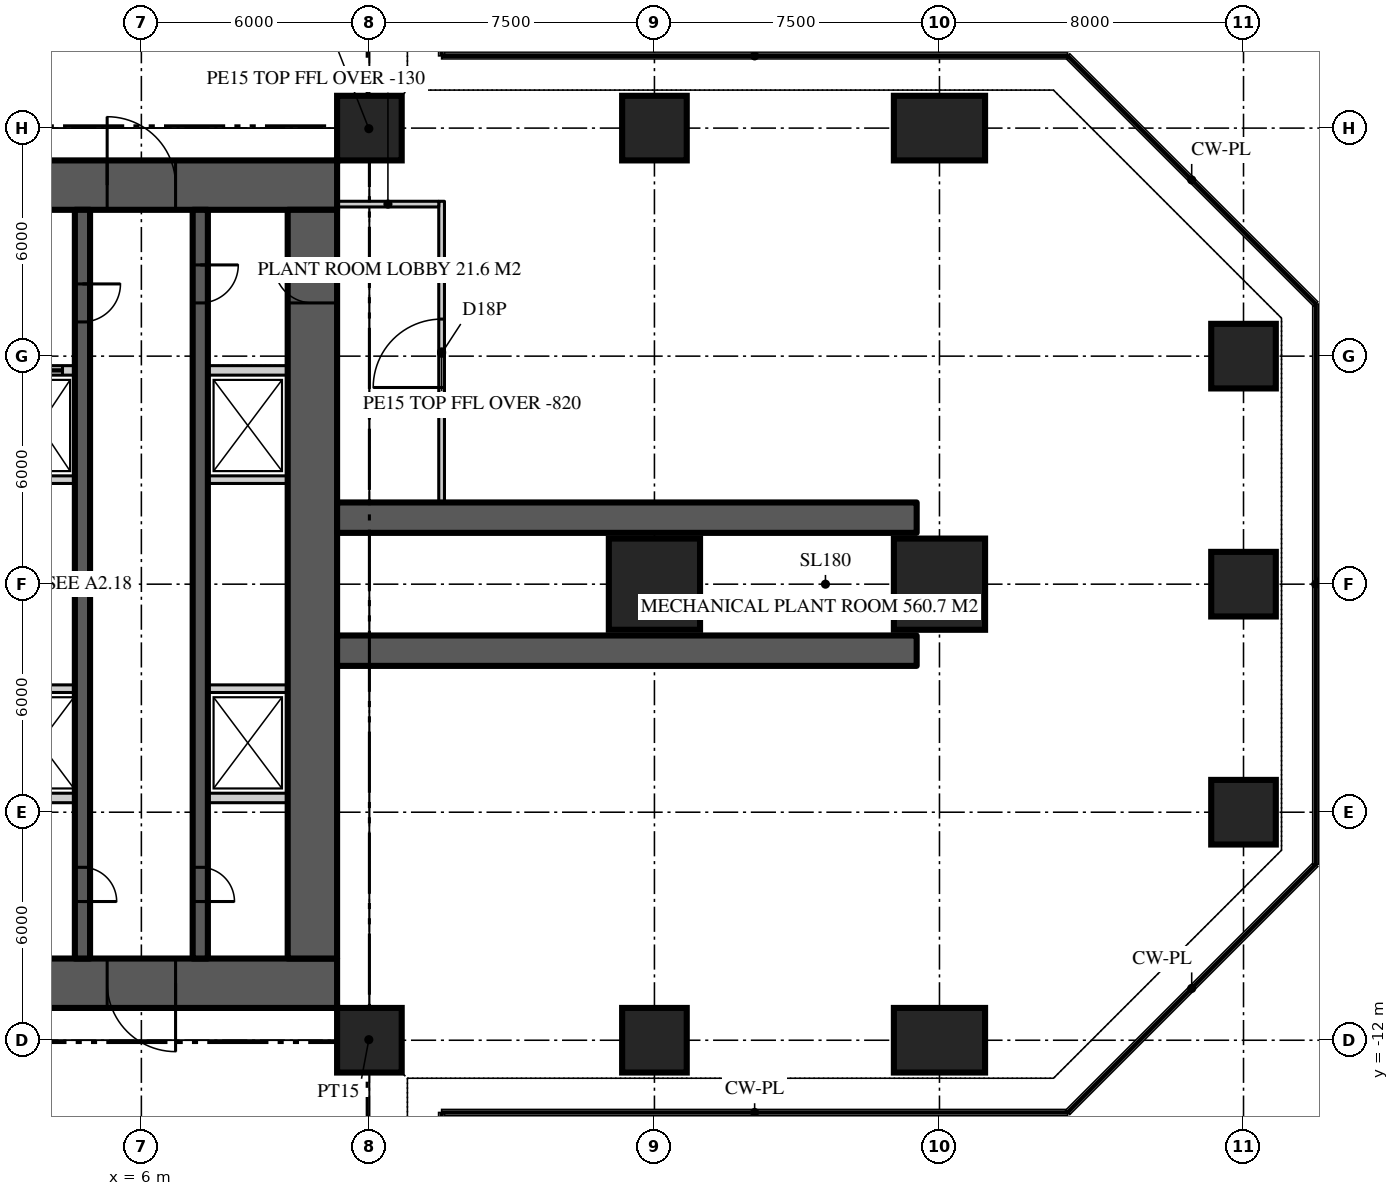
"""IFC4 building model, lengths in metres.
Left out: names, types, materials, properties, quantities, classifications, styles, units other than length and angle.
Written with IfcOpenShell. Run it as: python <this file> out.ifc"""

import sys

from ifc_helpers import new_model, si_unit, direction, frame, frame_2d, origin, origin_2d, place, context, subcontext, project, spatial, rectangle, extrude, element, fill, save


model = new_model("IFC4")
c1 = context("Model", 3, precision=1e-05, world=origin(), true_north=direction((0.0, 1.0)))
c2 = subcontext(c1, "Body", "Model", "MODEL_VIEW")
j1 = project(units=[si_unit("LENGTHUNIT", "METRE"), si_unit("PLANEANGLEUNIT", "RADIAN")], contexts=[c1])
p1 = place(None, origin())
s1 = spatial("IfcSite", under=j1, at=p1, CompositionType="ELEMENT")
p2 = place(p1, origin())
s2 = spatial("IfcBuilding", under=s1, at=p2, CompositionType="ELEMENT")
p3 = place(p2, frame((0.0, 0.0, 118.2)))
s3 = spatial("IfcBuildingStorey", under=s2, at=p3, CompositionType="ELEMENT", Elevation=118.2)
p4 = place(p3, frame((-11.15, 10.5, 0.0), z_axis=(0.0, 0.0, 1.0), x_axis=(1.0, 0.0, 0.0)))
e1 = element("IfcWall", 1, at=p4, inside=s3, PredefinedType="SHEAR", context=c2, shape_type="SweptSolid", body=[
    extrude(rectangle(XDim=22.3, YDim=1.3, at=frame_2d((11.15, 0.0))), origin(), (0.0, 0.0, 1.0), 6.0),
])
p5 = place(p4, frame((4.25, 0.0, 0.0)))
e2 = element("IfcOpeningElement", 2, at=p5, cuts=e1, PredefinedType="OPENING", context=c2, shape_type="SweptSolid", body=[
    extrude(rectangle(XDim=1.8, YDim=2.2, at=frame_2d((0.9, 1.1))), frame((0.0, 0.66, 0.0), z_axis=(0.0, -1.0, 0.0), x_axis=(1.0, 0.0, 0.0)), (0.0, 0.0, 1.0), 1.32),
])
p6 = place(p4, frame((16.25, 0.0, 0.0)))
e3 = element("IfcOpeningElement", 3, at=p6, cuts=e1, PredefinedType="OPENING", context=c2, shape_type="SweptSolid", body=[
    extrude(rectangle(XDim=1.8, YDim=2.2, at=frame_2d((0.9, 1.1))), frame((0.0, 0.66, 0.0), z_axis=(0.0, -1.0, 0.0), x_axis=(1.0, 0.0, 0.0)), (0.0, 0.0, 1.0), 1.32),
])
p7 = place(p3, frame((11.15, -10.5, 0.0), z_axis=(0.0, 0.0, 1.0), x_axis=(-1.0, 0.0, 0.0)))
e4 = element("IfcWall", 4, at=p7, inside=s3, PredefinedType="SHEAR", context=c2, shape_type="SweptSolid", body=[
    extrude(rectangle(XDim=22.3, YDim=1.3, at=frame_2d((11.15, 0.0))), origin(), (0.0, 0.0, 1.0), 6.0),
])
p8 = place(p7, frame((16.25, 0.0, 0.0)))
e5 = element("IfcOpeningElement", 5, at=p8, cuts=e4, PredefinedType="OPENING", context=c2, shape_type="SweptSolid", body=[
    extrude(rectangle(XDim=1.8, YDim=2.2, at=frame_2d((0.9, 1.1))), frame((0.0, 0.66, 0.0), z_axis=(0.0, -1.0, 0.0), x_axis=(1.0, 0.0, 0.0)), (0.0, 0.0, 1.0), 1.32),
])
p9 = place(p7, frame((4.25, 0.0, 0.0)))
e6 = element("IfcOpeningElement", 6, at=p9, cuts=e4, PredefinedType="OPENING", context=c2, shape_type="SweptSolid", body=[
    extrude(rectangle(XDim=1.8, YDim=2.2, at=frame_2d((0.9, 1.1))), frame((0.0, 0.66, 0.0), z_axis=(0.0, -1.0, 0.0), x_axis=(1.0, 0.0, 0.0)), (0.0, 0.0, 1.0), 1.32),
])
p10 = place(p3, frame((10.5, -9.85, 0.0), z_axis=(0.0, 0.0, 1.0), x_axis=(0.0, 1.0, 0.0)))
e7 = element("IfcWall", 7, at=p10, inside=s3, PredefinedType="SHEAR", context=c2, shape_type="SweptSolid", body=[
    extrude(rectangle(XDim=19.7, YDim=1.3, at=frame_2d((9.85, 0.0))), origin(), (0.0, 0.0, 1.0), 6.0),
])
p11 = place(p10, frame((17.25, 0.0, 0.0)))
e8 = element("IfcOpeningElement", 8, at=p11, cuts=e7, PredefinedType="OPENING", context=c2, shape_type="SweptSolid", body=[
    extrude(rectangle(XDim=1.0, YDim=2.2, at=frame_2d((0.5, 1.1))), frame((0.0, 0.66, 0.0), z_axis=(0.0, -1.0, 0.0), x_axis=(1.0, 0.0, 0.0)), (0.0, 0.0, 1.0), 1.32),
])
for number, where, z_axis, x_axis in (
    (9, (11.15, -1.75, 0.0), (0.0, 0.0, 1.0), (1.0, 0.0, 0.0)),
    (10, (11.15, 1.75, 0.0), (0.0, 0.0, 1.0), (1.0, 0.0, 0.0)),
):
    element("IfcWall", number, at=place(p3, frame(where, z_axis=z_axis, x_axis=x_axis)), inside=s3, PredefinedType="SHEAR", context=c2, shape_type="SweptSolid", body=[
        extrude(rectangle(XDim=15.25, YDim=0.8, at=frame_2d((7.625, 0.0))), origin(), (0.0, 0.0, 1.0), 6.0),
    ])
for number, where, z_axis, x_axis in (
    (11, (12.0, -12.0, 0.0), (0.0, 0.0, 1.0), (1.0, 0.0, 0.0)),
    (12, (19.5, -12.0, 0.0), (0.0, 0.0, 1.0), (1.0, 0.0, 0.0)),
):
    element("IfcColumn", number, at=place(p3, frame(where, z_axis=z_axis, x_axis=x_axis)), inside=s3, PredefinedType="COLUMN", context=c2, shape_type="SweptSolid", body=[
        extrude(rectangle(XDim=1.7, YDim=1.7, at=origin_2d()), origin(), (0.0, 0.0, 1.0), 6.0),
    ])
p12 = place(p3, frame((27.0, -12.0, 0.0), z_axis=(0.0, 0.0, 1.0), x_axis=(0.0, 1.0, 0.0)))
e13 = element("IfcColumn", 13, at=p12, inside=s3, PredefinedType="COLUMN", context=c2, shape_type="SweptSolid", body=[
    extrude(rectangle(XDim=1.7, YDim=2.4, at=origin_2d()), origin(), (0.0, 0.0, 1.0), 6.0),
])
p13 = place(p3, frame((35.0, -6.0, 0.0), z_axis=(0.0, 0.0, 1.0), x_axis=(1.0, 0.0, 0.0)))
e14 = element("IfcColumn", 14, at=p13, inside=s3, PredefinedType="COLUMN", context=c2, shape_type="SweptSolid", body=[
    extrude(rectangle(XDim=1.7, YDim=1.7, at=origin_2d()), origin(), (0.0, 0.0, 1.0), 6.0),
])
for number, where, z_axis, x_axis in (
    (15, (19.5, 0.0, 0.0), (0.0, 0.0, 1.0), (1.0, 0.0, 0.0)),
    (16, (27.0, 0.0, 0.0), (0.0, 0.0, 1.0), (1.0, 0.0, 0.0)),
):
    element("IfcColumn", number, at=place(p3, frame(where, z_axis=z_axis, x_axis=x_axis)), inside=s3, PredefinedType="COLUMN", context=c2, shape_type="SweptSolid", body=[
        extrude(rectangle(XDim=2.4, YDim=2.4, at=origin_2d()), origin(), (0.0, 0.0, 1.0), 6.0),
    ])
for number, where, z_axis, x_axis in (
    (17, (35.0, 0.0, 0.0), (0.0, 0.0, 1.0), (1.0, 0.0, 0.0)),
    (18, (35.0, 6.0, 0.0), (0.0, 0.0, 1.0), (1.0, 0.0, 0.0)),
    (19, (12.0, 12.0, 0.0), (0.0, 0.0, 1.0), (1.0, 0.0, 0.0)),
    (20, (19.5, 12.0, 0.0), (0.0, 0.0, 1.0), (1.0, 0.0, 0.0)),
):
    element("IfcColumn", number, at=place(p3, frame(where, z_axis=z_axis, x_axis=x_axis)), inside=s3, PredefinedType="COLUMN", context=c2, shape_type="SweptSolid", body=[
        extrude(rectangle(XDim=1.7, YDim=1.7, at=origin_2d()), origin(), (0.0, 0.0, 1.0), 6.0),
    ])
p14 = place(p3, frame((27.0, 12.0, 0.0), z_axis=(0.0, 0.0, 1.0), x_axis=(0.0, 1.0, 0.0)))
e21 = element("IfcColumn", 21, at=p14, inside=s3, PredefinedType="COLUMN", context=c2, shape_type="SweptSolid", body=[
    extrude(rectangle(XDim=1.7, YDim=2.4, at=origin_2d()), origin(), (0.0, 0.0, 1.0), 6.0),
])
p15 = place(p3, frame((7.55, 9.85, 0.0), z_axis=(0.0, 0.0, 1.0), x_axis=(0.0, -1.0, 0.0)))
e22 = element("IfcWall", 22, at=p15, inside=s3, PredefinedType="SHEAR", context=c2, shape_type="SweptSolid", body=[
    extrude(rectangle(XDim=19.7, YDim=0.4, at=frame_2d((9.85, 0.0))), origin(), (0.0, 0.0, 1.0), 6.0),
])
p16 = place(p15, frame((1.45, 0.0, 0.0)))
e23 = element("IfcOpeningElement", 23, at=p16, cuts=e22, PredefinedType="OPENING", context=c2, shape_type="SweptSolid", body=[
    extrude(rectangle(XDim=1.0, YDim=2.2, at=frame_2d((0.5, 1.1))), frame((0.0, 0.21, 0.0), z_axis=(0.0, -1.0, 0.0), x_axis=(1.0, 0.0, 0.0)), (0.0, 0.0, 1.0), 0.42),
])
p17 = place(p15, frame((17.3, 0.0, 0.0)))
e24 = element("IfcOpeningElement", 24, at=p17, cuts=e22, PredefinedType="OPENING", context=c2, shape_type="SweptSolid", body=[
    extrude(rectangle(XDim=0.9, YDim=2.1, at=frame_2d((0.45, 1.05))), frame((0.0, 0.21, 0.0), z_axis=(0.0, -1.0, 0.0), x_axis=(1.0, 0.0, 0.0)), (0.0, 0.0, 1.0), 0.42),
])
p18 = place(p3, frame((4.45, 9.85, 0.0), z_axis=(0.0, 0.0, 1.0), x_axis=(0.0, -1.0, 0.0)))
e25 = element("IfcWall", 25, at=p18, inside=s3, PredefinedType="SHEAR", context=c2, shape_type="SweptSolid", body=[
    extrude(rectangle(XDim=19.7, YDim=0.4, at=frame_2d((9.85, 0.0))), origin(), (0.0, 0.0, 1.0), 6.0),
])
p19 = place(p18, frame((1.95, 0.0, 0.0)))
e26 = element("IfcOpeningElement", 26, at=p19, cuts=e25, PredefinedType="OPENING", context=c2, shape_type="SweptSolid", body=[
    extrude(rectangle(XDim=1.0, YDim=2.2, at=frame_2d((0.5, 1.1))), frame((0.0, 0.21, 0.0), z_axis=(0.0, -1.0, 0.0), x_axis=(1.0, 0.0, 0.0)), (0.0, 0.0, 1.0), 0.42),
])
p20 = place(p18, frame((17.3, 0.0, 0.0)))
e27 = element("IfcOpeningElement", 27, at=p20, cuts=e25, PredefinedType="OPENING", context=c2, shape_type="SweptSolid", body=[
    extrude(rectangle(XDim=0.9, YDim=2.1, at=frame_2d((0.45, 1.05))), frame((0.0, 0.21, 0.0), z_axis=(0.0, -1.0, 0.0), x_axis=(1.0, 0.0, 0.0)), (0.0, 0.0, 1.0), 0.42),
])
p21 = place(p3, frame((2.4, 5.625, 0.0), z_axis=(0.0, 0.0, 1.0), x_axis=(1.0, 0.0, 0.0)))
e28 = element("IfcWall", 28, at=p21, inside=s3, PredefinedType="SOLIDWALL", context=c2, shape_type="SweptSolid", body=[
    extrude(rectangle(XDim=1.85, YDim=0.25, at=frame_2d((0.925, 0.0))), origin(), (0.0, 0.0, 1.0), 5.8),
])
p22 = place(p21, frame((0.325, 0.0, 0.0)))
e29 = element("IfcOpeningElement", 29, at=p22, cuts=e28, PredefinedType="OPENING", context=c2, shape_type="SweptSolid", body=[
    extrude(rectangle(XDim=1.2, YDim=2.2, at=frame_2d((0.6, 1.1))), frame((0.0, 0.135, 0.0), z_axis=(0.0, -1.0, 0.0), x_axis=(1.0, 0.0, 0.0)), (0.0, 0.0, 1.0), 0.27),
])
p23 = place(p3, frame((7.75, 5.625, 0.0), z_axis=(0.0, 0.0, 1.0), x_axis=(1.0, 0.0, 0.0)))
e30 = element("IfcWall", 30, at=p23, inside=s3, PredefinedType="SOLIDWALL", context=c2, shape_type="SweptSolid", body=[
    extrude(rectangle(XDim=2.1, YDim=0.25, at=frame_2d((1.05, 0.0))), origin(), (0.0, 0.0, 1.0), 5.8),
])
p24 = place(p3, frame((2.4, -5.625, 0.0), z_axis=(0.0, 0.0, 1.0), x_axis=(1.0, 0.0, 0.0)))
e31 = element("IfcWall", 31, at=p24, inside=s3, PredefinedType="SOLIDWALL", context=c2, shape_type="SweptSolid", body=[
    extrude(rectangle(XDim=1.85, YDim=0.25, at=frame_2d((0.925, 0.0))), origin(), (0.0, 0.0, 1.0), 5.8),
])
p25 = place(p3, frame((7.75, -5.625, 0.0), z_axis=(0.0, 0.0, 1.0), x_axis=(1.0, 0.0, 0.0)))
e32 = element("IfcWall", 32, at=p25, inside=s3, PredefinedType="SOLIDWALL", context=c2, shape_type="SweptSolid", body=[
    extrude(rectangle(XDim=2.1, YDim=0.25, at=frame_2d((1.05, 0.0))), origin(), (0.0, 0.0, 1.0), 5.8),
])
p26 = place(p3, frame((2.4, -2.75, 0.0), z_axis=(0.0, 0.0, 1.0), x_axis=(1.0, 0.0, 0.0)))
e33 = element("IfcWall", 33, at=p26, inside=s3, PredefinedType="SOLIDWALL", context=c2, shape_type="SweptSolid", body=[
    extrude(rectangle(XDim=1.85, YDim=0.2, at=frame_2d((0.925, 0.0))), origin(), (0.0, 0.0, 1.0), 5.8),
])
p27 = place(p3, frame((7.75, -2.75, 0.0), z_axis=(0.0, 0.0, 1.0), x_axis=(1.0, 0.0, 0.0)))
e34 = element("IfcWall", 34, at=p27, inside=s3, PredefinedType="SOLIDWALL", context=c2, shape_type="SweptSolid", body=[
    extrude(rectangle(XDim=2.1, YDim=0.2, at=frame_2d((1.05, 0.0))), origin(), (0.0, 0.0, 1.0), 5.8),
])
p28 = place(p3, frame((2.4, 2.75, 0.0), z_axis=(0.0, 0.0, 1.0), x_axis=(1.0, 0.0, 0.0)))
e35 = element("IfcWall", 35, at=p28, inside=s3, PredefinedType="SOLIDWALL", context=c2, shape_type="SweptSolid", body=[
    extrude(rectangle(XDim=1.85, YDim=0.2, at=frame_2d((0.925, 0.0))), origin(), (0.0, 0.0, 1.0), 5.8),
])
p29 = place(p3, frame((7.75, 2.75, 0.0), z_axis=(0.0, 0.0, 1.0), x_axis=(1.0, 0.0, 0.0)))
e36 = element("IfcWall", 36, at=p29, inside=s3, PredefinedType="SOLIDWALL", context=c2, shape_type="SweptSolid", body=[
    extrude(rectangle(XDim=2.1, YDim=0.2, at=frame_2d((1.05, 0.0))), origin(), (0.0, 0.0, 1.0), 5.8),
])
p30 = place(p3, frame((13.9, 2.15, 0.0), z_axis=(0.0, 0.0, 1.0), x_axis=(0.0, 1.0, 0.0)))
e37 = element("IfcWall", 37, at=p30, inside=s3, PredefinedType="SOLIDWALL", context=c2, shape_type="SweptSolid", body=[
    extrude(rectangle(XDim=7.925, YDim=0.15, at=frame_2d((3.962, 0.0))), origin(), (0.0, 0.0, 1.0), 5.18),
])
p31 = place(p30, frame((3.025, 0.0, 0.0)))
e38 = element("IfcOpeningElement", 38, at=p31, cuts=e37, PredefinedType="OPENING", context=c2, shape_type="SweptSolid", body=[
    extrude(rectangle(XDim=1.8, YDim=2.4, at=frame_2d((0.9, 1.2))), frame((0.0, 0.085, 0.0), z_axis=(0.0, -1.0, 0.0), x_axis=(1.0, 0.0, 0.0)), (0.0, 0.0, 1.0), 0.17),
])
p32 = place(p3, frame((11.15, 10.0, 0.0), z_axis=(0.0, 0.0, 1.0), x_axis=(1.0, 0.0, 0.0)))
e39 = element("IfcWall", 39, at=p32, inside=s3, PredefinedType="SOLIDWALL", context=c2, shape_type="SweptSolid", body=[
    extrude(rectangle(XDim=2.675, YDim=0.15, at=frame_2d((1.337, 0.0))), origin(), (0.0, 0.0, 1.0), 5.87),
])
for number, where, z_axis, x_axis in (
    (40, (11.15, 11.15, 0.0), (0.0, 0.0, 1.0), (0.707, 0.707, 0.0)),
    (41, (11.15, -11.15, 0.0), (0.0, 0.0, 1.0), (0.707, -0.707, 0.0)),
):
    element("IfcWall", number, at=place(p3, frame(where, z_axis=z_axis, x_axis=x_axis)), inside=s3, PredefinedType="PARTITIONING", context=c2, shape_type="SweptSolid", body=[
        extrude(rectangle(XDim=2.362, YDim=0.15, at=frame_2d((1.181, 0.0))), origin(), (0.0, 0.0, 1.0), 5.32),
    ])
p33 = place(p6, origin())
e42 = element("IfcDoor", 42, at=p33, inside=s3, OperationType="DOUBLE_DOOR_DOUBLE_SWING", PredefinedType="DOOR", context=c2, shape_type="SweptSolid", body=[
    extrude(rectangle(XDim=1.8, YDim=2.2, at=frame_2d((0.9, 1.1))), frame((0.0, 0.025, 0.0), z_axis=(0.0, -1.0, 0.0), x_axis=(1.0, 0.0, 0.0)), (0.0, 0.0, 1.0), 0.05),
])
fill(e3, e42)
p34 = place(p9, origin())
e43 = element("IfcDoor", 43, at=p34, inside=s3, OperationType="DOUBLE_DOOR_DOUBLE_SWING", PredefinedType="DOOR", context=c2, shape_type="SweptSolid", body=[
    extrude(rectangle(XDim=1.8, YDim=2.2, at=frame_2d((0.9, 1.1))), frame((0.0, 0.025, 0.0), z_axis=(0.0, -1.0, 0.0), x_axis=(1.0, 0.0, 0.0)), (0.0, 0.0, 1.0), 0.05),
])
fill(e6, e43)
p35 = place(p16, origin())
e44 = element("IfcDoor", 44, at=p35, inside=s3, OperationType="SINGLE_SWING_LEFT", PredefinedType="DOOR", context=c2, shape_type="SweptSolid", body=[
    extrude(rectangle(XDim=1.0, YDim=2.2, at=frame_2d((0.5, 1.1))), frame((0.0, 0.025, 0.0), z_axis=(0.0, -1.0, 0.0), x_axis=(1.0, 0.0, 0.0)), (0.0, 0.0, 1.0), 0.05),
])
fill(e23, e44)
p36 = place(p11, origin())
e45 = element("IfcDoor", 45, at=p36, inside=s3, OperationType="SINGLE_SWING_RIGHT", PredefinedType="DOOR", context=c2, shape_type="SweptSolid", body=[
    extrude(rectangle(XDim=1.0, YDim=2.2, at=frame_2d((0.5, 1.1))), frame((0.0, 0.025, 0.0), z_axis=(0.0, -1.0, 0.0), x_axis=(1.0, 0.0, 0.0)), (0.0, 0.0, 1.0), 0.05),
])
fill(e8, e45)
p37 = place(p19, origin())
e46 = element("IfcDoor", 46, at=p37, inside=s3, OperationType="SINGLE_SWING_LEFT", PredefinedType="DOOR", context=c2, shape_type="SweptSolid", body=[
    extrude(rectangle(XDim=1.0, YDim=2.2, at=frame_2d((0.5, 1.1))), frame((0.0, 0.025, 0.0), z_axis=(0.0, -1.0, 0.0), x_axis=(1.0, 0.0, 0.0)), (0.0, 0.0, 1.0), 0.05),
])
fill(e26, e46)
p38 = place(p17, origin())
e47 = element("IfcDoor", 47, at=p38, inside=s3, OperationType="SINGLE_SWING_RIGHT", PredefinedType="DOOR", context=c2, shape_type="SweptSolid", body=[
    extrude(rectangle(XDim=0.9, YDim=2.1, at=frame_2d((0.45, 1.05))), frame((0.0, 0.025, 0.0), z_axis=(0.0, -1.0, 0.0), x_axis=(1.0, 0.0, 0.0)), (0.0, 0.0, 1.0), 0.05),
])
fill(e24, e47)
p39 = place(p20, origin())
e48 = element("IfcDoor", 48, at=p39, inside=s3, OperationType="SINGLE_SWING_RIGHT", PredefinedType="DOOR", context=c2, shape_type="SweptSolid", body=[
    extrude(rectangle(XDim=0.9, YDim=2.1, at=frame_2d((0.45, 1.05))), frame((0.0, 0.025, 0.0), z_axis=(0.0, -1.0, 0.0), x_axis=(1.0, 0.0, 0.0)), (0.0, 0.0, 1.0), 0.05),
])
fill(e27, e48)
p40 = place(p22, origin())
e49 = element("IfcDoor", 49, at=p40, inside=s3, OperationType="SLIDING_TO_LEFT", PredefinedType="DOOR", context=c2, shape_type="SweptSolid", body=[
    extrude(rectangle(XDim=1.2, YDim=2.2, at=frame_2d((0.6, 1.1))), frame((0.0, 0.025, 0.0), z_axis=(0.0, -1.0, 0.0), x_axis=(1.0, 0.0, 0.0)), (0.0, 0.0, 1.0), 0.05),
])
fill(e29, e49)
p41 = place(p31, origin())
e50 = element("IfcDoor", 50, at=p41, inside=s3, OperationType="DOUBLE_DOOR_DOUBLE_SWING", PredefinedType="DOOR", context=c2, shape_type="SweptSolid", body=[
    extrude(rectangle(XDim=1.8, YDim=2.4, at=frame_2d((0.9, 1.2))), frame((0.0, 0.025, 0.0), z_axis=(0.0, -1.0, 0.0), x_axis=(1.0, 0.0, 0.0)), (0.0, 0.0, 1.0), 0.05),
])
fill(e38, e50)
save(model, sys.argv[1])
